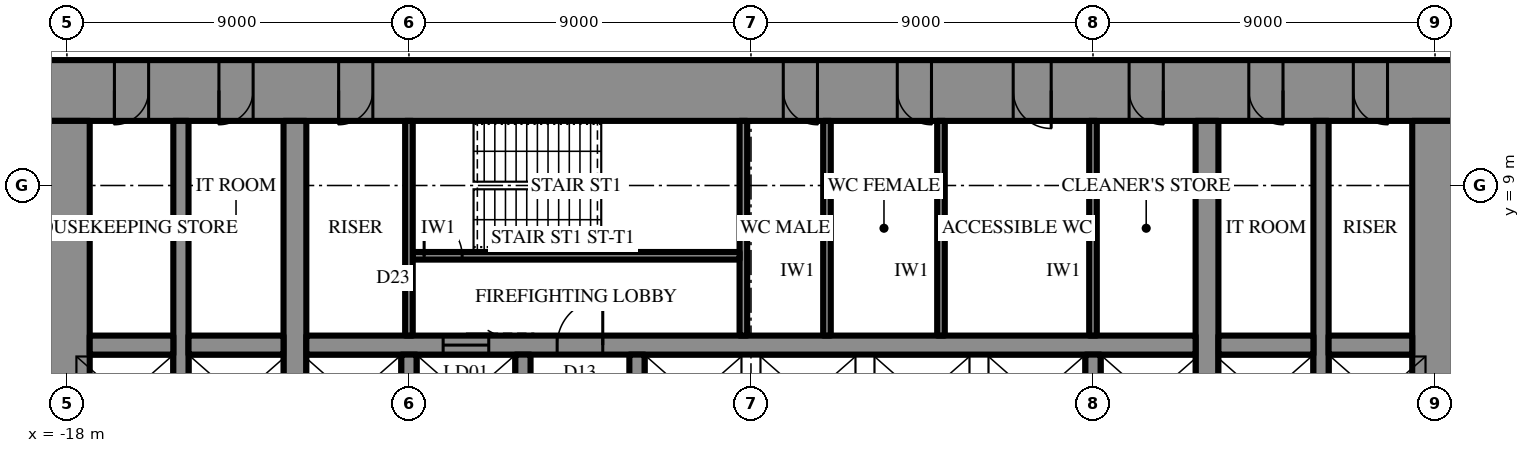
"""IFC4 building model, lengths in metres.
Left out: names, types, materials, properties, quantities, classifications, styles, units other than length and angle.
Written with IfcOpenShell. Run it as: python <this file> out.ifc"""

import sys

from ifc_helpers import new_model, si_unit, direction, frame, frame_2d, origin, place, context, subcontext, project, spatial, rectangle, extrude, element, fill, save


model = new_model("IFC4")
c1 = context("Model", 3, precision=1e-05, world=origin(), true_north=direction((0.0, 1.0)))
c2 = subcontext(c1, "Body", "Model", "MODEL_VIEW")
j1 = project(units=[si_unit("LENGTHUNIT", "METRE"), si_unit("PLANEANGLEUNIT", "RADIAN")], contexts=[c1])
p1 = place(None, origin())
s1 = spatial("IfcSite", under=j1, at=p1, CompositionType="ELEMENT")
p2 = place(p1, origin())
s2 = spatial("IfcBuilding", under=s1, at=p2, CompositionType="ELEMENT")
p3 = place(p2, frame((0.0, 0.0, -4.5)))
s3 = spatial("IfcBuildingStorey", under=s2, at=p3, CompositionType="ELEMENT", Elevation=-4.5)
p4 = place(p3, frame((-18.6, 11.5, 0.0), z_axis=(0.0, 0.0, 1.0), x_axis=(1.0, 0.0, 0.0)))
e1 = element("IfcWall", 1, at=p4, inside=s3, PredefinedType="SHEAR", context=c2, shape_type="SweptSolid", body=[
    extrude(rectangle(XDim=37.2, YDim=1.6, at=frame_2d((18.6, 0.0))), origin(), (0.0, 0.0, 1.0), 4.5),
])
p5 = place(p4, frame((19.45, 0.0, 0.0)))
e2 = element("IfcOpeningElement", 2, at=p5, cuts=e1, PredefinedType="OPENING", context=c2, shape_type="SweptSolid", body=[
    extrude(rectangle(XDim=0.9, YDim=2.2, at=frame_2d((0.45, 1.1))), frame((0.0, 0.81, 0.0), z_axis=(0.0, -1.0, 0.0), x_axis=(1.0, 0.0, 0.0)), (0.0, 0.0, 1.0), 1.62),
])
p6 = place(p4, frame((22.45, 0.0, 0.0)))
e3 = element("IfcOpeningElement", 3, at=p6, cuts=e1, PredefinedType="OPENING", context=c2, shape_type="SweptSolid", body=[
    extrude(rectangle(XDim=0.9, YDim=2.2, at=frame_2d((0.45, 1.1))), frame((0.0, 0.81, 0.0), z_axis=(0.0, -1.0, 0.0), x_axis=(1.0, 0.0, 0.0)), (0.0, 0.0, 1.0), 1.62),
])
p7 = place(p4, frame((25.5, 0.0, 0.0)))
e4 = element("IfcOpeningElement", 4, at=p7, cuts=e1, PredefinedType="OPENING", context=c2, shape_type="SweptSolid", body=[
    extrude(rectangle(XDim=1.0, YDim=2.2, at=frame_2d((0.5, 1.1))), frame((0.0, 0.81, 0.0), z_axis=(0.0, -1.0, 0.0), x_axis=(1.0, 0.0, 0.0)), (0.0, 0.0, 1.0), 1.62),
])
p8 = place(p4, frame((1.85, 0.0, 0.0)))
e5 = element("IfcOpeningElement", 5, at=p8, cuts=e1, PredefinedType="OPENING", context=c2, shape_type="SweptSolid", body=[
    extrude(rectangle(XDim=0.9, YDim=2.2, at=frame_2d((0.45, 1.1))), frame((0.0, 0.81, 0.0), z_axis=(0.0, -1.0, 0.0), x_axis=(1.0, 0.0, 0.0)), (0.0, 0.0, 1.0), 1.62),
])
p9 = place(p4, frame((4.6, 0.0, 0.0)))
e6 = element("IfcOpeningElement", 6, at=p9, cuts=e1, PredefinedType="OPENING", context=c2, shape_type="SweptSolid", body=[
    extrude(rectangle(XDim=0.9, YDim=2.2, at=frame_2d((0.45, 1.1))), frame((0.0, 0.81, 0.0), z_axis=(0.0, -1.0, 0.0), x_axis=(1.0, 0.0, 0.0)), (0.0, 0.0, 1.0), 1.62),
])
p10 = place(p4, frame((7.75, 0.0, 0.0)))
e7 = element("IfcOpeningElement", 7, at=p10, cuts=e1, PredefinedType="OPENING", context=c2, shape_type="SweptSolid", body=[
    extrude(rectangle(XDim=0.9, YDim=2.2, at=frame_2d((0.45, 1.1))), frame((0.0, 0.81, 0.0), z_axis=(0.0, -1.0, 0.0), x_axis=(1.0, 0.0, 0.0)), (0.0, 0.0, 1.0), 1.62),
])
p11 = place(p4, frame((28.55, 0.0, 0.0)))
e8 = element("IfcOpeningElement", 8, at=p11, cuts=e1, PredefinedType="OPENING", context=c2, shape_type="SweptSolid", body=[
    extrude(rectangle(XDim=0.9, YDim=2.2, at=frame_2d((0.45, 1.1))), frame((0.0, 0.81, 0.0), z_axis=(0.0, -1.0, 0.0), x_axis=(1.0, 0.0, 0.0)), (0.0, 0.0, 1.0), 1.62),
])
p12 = place(p4, frame((31.7, 0.0, 0.0)))
e9 = element("IfcOpeningElement", 9, at=p12, cuts=e1, PredefinedType="OPENING", context=c2, shape_type="SweptSolid", body=[
    extrude(rectangle(XDim=0.9, YDim=2.2, at=frame_2d((0.45, 1.1))), frame((0.0, 0.81, 0.0), z_axis=(0.0, -1.0, 0.0), x_axis=(1.0, 0.0, 0.0)), (0.0, 0.0, 1.0), 1.62),
])
p13 = place(p4, frame((34.45, 0.0, 0.0)))
e10 = element("IfcOpeningElement", 10, at=p13, cuts=e1, PredefinedType="OPENING", context=c2, shape_type="SweptSolid", body=[
    extrude(rectangle(XDim=0.9, YDim=2.2, at=frame_2d((0.45, 1.1))), frame((0.0, 0.81, 0.0), z_axis=(0.0, -1.0, 0.0), x_axis=(1.0, 0.0, 0.0)), (0.0, 0.0, 1.0), 1.62),
])
p14 = place(p3, frame((18.0, -10.7, 0.0), z_axis=(0.0, 0.0, 1.0), x_axis=(0.0, 1.0, 0.0)))
e11 = element("IfcWall", 11, at=p14, inside=s3, PredefinedType="SHEAR", context=c2, shape_type="SweptSolid", body=[
    extrude(rectangle(XDim=21.4, YDim=1.2, at=frame_2d((10.7, 0.0))), origin(), (0.0, 0.0, 1.0), 4.5),
])
p15 = place(p14, frame((9.8, 0.0, 0.0)))
e12 = element("IfcOpeningElement", 12, at=p15, cuts=e11, PredefinedType="OPENING", context=c2, shape_type="SweptSolid", body=[
    extrude(rectangle(XDim=1.8, YDim=2.4, at=frame_2d((0.9, 1.2))), frame((0.0, 0.61, 0.0), z_axis=(0.0, -1.0, 0.0), x_axis=(1.0, 0.0, 0.0)), (0.0, 0.0, 1.0), 1.22),
])
p16 = place(p3, frame((-18.0, 10.7, 0.0), z_axis=(0.0, 0.0, 1.0), x_axis=(0.0, -1.0, 0.0)))
e13 = element("IfcWall", 13, at=p16, inside=s3, PredefinedType="SHEAR", context=c2, shape_type="SweptSolid", body=[
    extrude(rectangle(XDim=21.4, YDim=1.2, at=frame_2d((10.7, 0.0))), origin(), (0.0, 0.0, 1.0), 4.5),
])
p17 = place(p16, frame((9.8, 0.0, 0.0)))
e14 = element("IfcOpeningElement", 14, at=p17, cuts=e13, PredefinedType="OPENING", context=c2, shape_type="SweptSolid", body=[
    extrude(rectangle(XDim=1.8, YDim=2.4, at=frame_2d((0.9, 1.2))), frame((0.0, 0.61, 0.0), z_axis=(0.0, -1.0, 0.0), x_axis=(1.0, 0.0, 0.0)), (0.0, 0.0, 1.0), 1.22),
])
p18 = place(p3, frame((12.0, -10.7, 0.0), z_axis=(0.0, 0.0, 1.0), x_axis=(0.0, 1.0, 0.0)))
e15 = element("IfcWall", 15, at=p18, inside=s3, PredefinedType="SHEAR", context=c2, shape_type="SweptSolid", body=[
    extrude(rectangle(XDim=21.4, YDim=0.6, at=frame_2d((10.7, 0.0))), origin(), (0.0, 0.0, 1.0), 4.5),
])
p19 = place(p18, frame((9.8, 0.0, 0.0)))
e16 = element("IfcOpeningElement", 16, at=p19, cuts=e15, PredefinedType="OPENING", context=c2, shape_type="SweptSolid", body=[
    extrude(rectangle(XDim=1.8, YDim=2.4, at=frame_2d((0.9, 1.2))), frame((0.0, 0.31, 0.0), z_axis=(0.0, -1.0, 0.0), x_axis=(1.0, 0.0, 0.0)), (0.0, 0.0, 1.0), 0.62),
])
p20 = place(p3, frame((-12.0, -10.7, 0.0), z_axis=(0.0, 0.0, 1.0), x_axis=(0.0, 1.0, 0.0)))
e17 = element("IfcWall", 17, at=p20, inside=s3, PredefinedType="SHEAR", context=c2, shape_type="SweptSolid", body=[
    extrude(rectangle(XDim=21.4, YDim=0.6, at=frame_2d((10.7, 0.0))), origin(), (0.0, 0.0, 1.0), 4.5),
])
p21 = place(p20, frame((9.8, 0.0, 0.0)))
e18 = element("IfcOpeningElement", 18, at=p21, cuts=e17, PredefinedType="OPENING", context=c2, shape_type="SweptSolid", body=[
    extrude(rectangle(XDim=1.8, YDim=2.4, at=frame_2d((0.9, 1.2))), frame((0.0, 0.31, 0.0), z_axis=(0.0, -1.0, 0.0), x_axis=(1.0, 0.0, 0.0)), (0.0, 0.0, 1.0), 0.62),
])
p22 = place(p3, frame((15.0, -10.7, 0.0), z_axis=(0.0, 0.0, 1.0), x_axis=(0.0, 1.0, 0.0)))
e19 = element("IfcWall", 19, at=p22, inside=s3, PredefinedType="SHEAR", context=c2, shape_type="SweptSolid", body=[
    extrude(rectangle(XDim=21.4, YDim=0.4, at=frame_2d((10.7, 0.0))), origin(), (0.0, 0.0, 1.0), 4.5),
])
p23 = place(p22, frame((9.8, 0.0, 0.0)))
e20 = element("IfcOpeningElement", 20, at=p23, cuts=e19, PredefinedType="OPENING", context=c2, shape_type="SweptSolid", body=[
    extrude(rectangle(XDim=1.8, YDim=2.4, at=frame_2d((0.9, 1.2))), frame((0.0, 0.21, 0.0), z_axis=(0.0, -1.0, 0.0), x_axis=(1.0, 0.0, 0.0)), (0.0, 0.0, 1.0), 0.42),
])
p24 = place(p3, frame((-15.0, -10.7, 0.0), z_axis=(0.0, 0.0, 1.0), x_axis=(0.0, 1.0, 0.0)))
e21 = element("IfcWall", 21, at=p24, inside=s3, PredefinedType="SHEAR", context=c2, shape_type="SweptSolid", body=[
    extrude(rectangle(XDim=21.4, YDim=0.4, at=frame_2d((10.7, 0.0))), origin(), (0.0, 0.0, 1.0), 4.5),
])
p25 = place(p24, frame((9.8, 0.0, 0.0)))
e22 = element("IfcOpeningElement", 22, at=p25, cuts=e21, PredefinedType="OPENING", context=c2, shape_type="SweptSolid", body=[
    extrude(rectangle(XDim=1.8, YDim=2.4, at=frame_2d((0.9, 1.2))), frame((0.0, 0.21, 0.0), z_axis=(0.0, -1.0, 0.0), x_axis=(1.0, 0.0, 0.0)), (0.0, 0.0, 1.0), 0.42),
])
p26 = place(p3, frame((-17.4, 4.8, 0.0), z_axis=(0.0, 0.0, 1.0), x_axis=(1.0, 0.0, 0.0)))
e23 = element("IfcWall", 23, at=p26, inside=s3, PredefinedType="SHEAR", context=c2, shape_type="SweptSolid", body=[
    extrude(rectangle(XDim=2.2, YDim=0.5, at=frame_2d((1.1, 0.0))), origin(), (0.0, 0.0, 1.0), 4.5),
])
p27 = place(p3, frame((-14.8, 4.8, 0.0), z_axis=(0.0, 0.0, 1.0), x_axis=(1.0, 0.0, 0.0)))
e24 = element("IfcWall", 24, at=p27, inside=s3, PredefinedType="SHEAR", context=c2, shape_type="SweptSolid", body=[
    extrude(rectangle(XDim=2.5, YDim=0.5, at=frame_2d((1.25, 0.0))), origin(), (0.0, 0.0, 1.0), 4.5),
])
p28 = place(p3, frame((-11.7, 4.8, 0.0), z_axis=(0.0, 0.0, 1.0), x_axis=(1.0, 0.0, 0.0)))
e25 = element("IfcWall", 25, at=p28, inside=s3, PredefinedType="SHEAR", context=c2, shape_type="SweptSolid", body=[
    extrude(rectangle(XDim=23.4, YDim=0.5, at=frame_2d((11.7, 0.0))), origin(), (0.0, 0.0, 1.0), 4.5),
])
p29 = place(p28, frame((6.6, 0.0, 0.0)))
e26 = element("IfcOpeningElement", 26, at=p29, cuts=e25, PredefinedType="OPENING", context=c2, shape_type="SweptSolid", body=[
    extrude(rectangle(XDim=1.2, YDim=2.2, at=frame_2d((0.6, 1.1))), frame((0.0, 0.26, 0.0), z_axis=(0.0, -1.0, 0.0), x_axis=(1.0, 0.0, 0.0)), (0.0, 0.0, 1.0), 0.52),
])
p30 = place(p28, frame((3.6, 0.0, 0.0)))
e27 = element("IfcOpeningElement", 27, at=p30, cuts=e25, PredefinedType="OPENING", context=c2, shape_type="SweptSolid", body=[
    extrude(rectangle(XDim=1.2, YDim=2.2, at=frame_2d((0.6, 1.1))), frame((0.0, 0.26, 0.0), z_axis=(0.0, -1.0, 0.0), x_axis=(1.0, 0.0, 0.0)), (0.0, 0.0, 1.0), 0.52),
])
p31 = place(p3, frame((12.3, 4.8, 0.0), z_axis=(0.0, 0.0, 1.0), x_axis=(1.0, 0.0, 0.0)))
e28 = element("IfcWall", 28, at=p31, inside=s3, PredefinedType="SHEAR", context=c2, shape_type="SweptSolid", body=[
    extrude(rectangle(XDim=2.5, YDim=0.5, at=frame_2d((1.25, 0.0))), origin(), (0.0, 0.0, 1.0), 4.5),
])
p32 = place(p3, frame((15.2, 4.8, 0.0), z_axis=(0.0, 0.0, 1.0), x_axis=(1.0, 0.0, 0.0)))
e29 = element("IfcWall", 29, at=p32, inside=s3, PredefinedType="SHEAR", context=c2, shape_type="SweptSolid", body=[
    extrude(rectangle(XDim=2.2, YDim=0.5, at=frame_2d((1.1, 0.0))), origin(), (0.0, 0.0, 1.0), 4.5),
])
for number, where, z_axis, x_axis in (
    (30, (-9.0, 2.25, 0.0), (0.0, 0.0, 1.0), (0.0, 1.0, 0.0)),
    (31, (-6.0, 2.25, 0.0), (0.0, 0.0, 1.0), (0.0, 1.0, 0.0)),
    (32, (-3.0, 2.25, 0.0), (0.0, 0.0, 1.0), (0.0, 1.0, 0.0)),
    (33, (9.0, 2.25, 0.0), (0.0, 0.0, 1.0), (0.0, 1.0, 0.0)),
):
    element("IfcWall", number, at=place(p3, frame(where, z_axis=z_axis, x_axis=x_axis)), inside=s3, PredefinedType="SHEAR", context=c2, shape_type="SweptSolid", body=[
        extrude(rectangle(XDim=2.3, YDim=0.4, at=frame_2d((1.15, 0.0))), origin(), (0.0, 0.0, 1.0), 4.5),
    ])
p33 = place(p3, frame((-0.2, 5.05, 0.0), z_axis=(0.0, 0.0, 1.0), x_axis=(0.0, 1.0, 0.0)))
e34 = element("IfcWall", 34, at=p33, inside=s3, PredefinedType="SHEAR", context=c2, shape_type="SweptSolid", body=[
    extrude(rectangle(XDim=5.65, YDim=0.2, at=frame_2d((2.825, 0.0))), origin(), (0.0, 0.0, 1.0), 4.5),
])
p34 = place(p3, frame((-8.9, 7.15, 0.0), z_axis=(0.0, 0.0, 1.0), x_axis=(1.0, 0.0, 0.0)))
e35 = element("IfcWall", 35, at=p34, inside=s3, PredefinedType="SHEAR", context=c2, shape_type="SweptSolid", body=[
    extrude(rectangle(XDim=8.6, YDim=0.2, at=frame_2d((4.3, 0.0))), origin(), (0.0, 0.0, 1.0), 4.5),
])
p35 = place(p34, frame((0.3, 0.0, 0.0)))
e36 = element("IfcOpeningElement", 36, at=p35, cuts=e35, PredefinedType="OPENING", context=c2, shape_type="SweptSolid", body=[
    extrude(rectangle(XDim=1.0, YDim=2.2, at=frame_2d((0.5, 1.1))), frame((0.0, 0.11, 0.0), z_axis=(0.0, -1.0, 0.0), x_axis=(1.0, 0.0, 0.0)), (0.0, 0.0, 1.0), 0.22),
])
for number, where, z_axis, x_axis in (
    (37, (-9.0, 5.05, 0.0), (0.0, 0.0, 1.0), (0.0, 1.0, 0.0)),
    (38, (9.0, 5.05, 0.0), (0.0, 0.0, 1.0), (0.0, 1.0, 0.0)),
    (39, (2.0, 5.05, 0.0), (0.0, 0.0, 1.0), (0.0, 1.0, 0.0)),
    (40, (5.0, 5.05, 0.0), (0.0, 0.0, 1.0), (0.0, 1.0, 0.0)),
):
    element("IfcWall", number, at=place(p3, frame(where, z_axis=z_axis, x_axis=x_axis)), inside=s3, PredefinedType="PARTITIONING", context=c2, shape_type="SweptSolid", body=[
        extrude(rectangle(XDim=5.65, YDim=0.2, at=frame_2d((2.825, 0.0))), origin(), (0.0, 0.0, 1.0), 4.15),
    ])
p36 = place(p29, origin())
e41 = element("IfcDoor", 41, at=p36, inside=s3, OperationType="SINGLE_SWING_LEFT", PredefinedType="DOOR", context=c2, shape_type="SweptSolid", body=[
    extrude(rectangle(XDim=1.2, YDim=2.2, at=frame_2d((0.6, 1.1))), frame((0.0, 0.025, 0.0), z_axis=(0.0, -1.0, 0.0), x_axis=(1.0, 0.0, 0.0)), (0.0, 0.0, 1.0), 0.05),
])
fill(e26, e41)
p37 = place(p35, origin())
e42 = element("IfcDoor", 42, at=p37, inside=s3, OperationType="SINGLE_SWING_RIGHT", PredefinedType="DOOR", context=c2, shape_type="SweptSolid", body=[
    extrude(rectangle(XDim=1.0, YDim=2.2, at=frame_2d((0.5, 1.1))), frame((0.0, 0.025, 0.0), z_axis=(0.0, -1.0, 0.0), x_axis=(1.0, 0.0, 0.0)), (0.0, 0.0, 1.0), 0.05),
])
fill(e36, e42)
p38 = place(p5, frame((0.9, 0.0, 0.0), z_axis=(0.0, 0.0, 1.0), x_axis=(-1.0, 0.0, 0.0)))
e43 = element("IfcDoor", 43, at=p38, inside=s3, OperationType="SINGLE_SWING_RIGHT", PredefinedType="DOOR", context=c2, shape_type="SweptSolid", body=[
    extrude(rectangle(XDim=0.9, YDim=2.2, at=frame_2d((0.45, 1.1))), frame((0.0, 0.025, 0.0), z_axis=(0.0, -1.0, 0.0), x_axis=(1.0, 0.0, 0.0)), (0.0, 0.0, 1.0), 0.05),
])
fill(e2, e43)
p39 = place(p6, frame((0.9, 0.0, 0.0), z_axis=(0.0, 0.0, 1.0), x_axis=(-1.0, 0.0, 0.0)))
e44 = element("IfcDoor", 44, at=p39, inside=s3, OperationType="SINGLE_SWING_RIGHT", PredefinedType="DOOR", context=c2, shape_type="SweptSolid", body=[
    extrude(rectangle(XDim=0.9, YDim=2.2, at=frame_2d((0.45, 1.1))), frame((0.0, 0.025, 0.0), z_axis=(0.0, -1.0, 0.0), x_axis=(1.0, 0.0, 0.0)), (0.0, 0.0, 1.0), 0.05),
])
fill(e3, e44)
p40 = place(p7, frame((1.0, 0.0, 0.0), z_axis=(0.0, 0.0, 1.0), x_axis=(-1.0, 0.0, 0.0)))
e45 = element("IfcDoor", 45, at=p40, inside=s3, OperationType="SINGLE_SWING_RIGHT", PredefinedType="DOOR", context=c2, shape_type="SweptSolid", body=[
    extrude(rectangle(XDim=1.0, YDim=2.2, at=frame_2d((0.5, 1.1))), frame((0.0, 0.025, 0.0), z_axis=(0.0, -1.0, 0.0), x_axis=(1.0, 0.0, 0.0)), (0.0, 0.0, 1.0), 0.05),
])
fill(e4, e45)
p41 = place(p8, frame((0.9, 0.0, 0.0), z_axis=(0.0, 0.0, 1.0), x_axis=(-1.0, 0.0, 0.0)))
e46 = element("IfcDoor", 46, at=p41, inside=s3, OperationType="SINGLE_SWING_LEFT", PredefinedType="DOOR", context=c2, shape_type="SweptSolid", body=[
    extrude(rectangle(XDim=0.9, YDim=2.2, at=frame_2d((0.45, 1.1))), frame((0.0, 0.025, 0.0), z_axis=(0.0, -1.0, 0.0), x_axis=(1.0, 0.0, 0.0)), (0.0, 0.0, 1.0), 0.05),
])
fill(e5, e46)
p42 = place(p9, frame((0.9, 0.0, 0.0), z_axis=(0.0, 0.0, 1.0), x_axis=(-1.0, 0.0, 0.0)))
e47 = element("IfcDoor", 47, at=p42, inside=s3, OperationType="SINGLE_SWING_LEFT", PredefinedType="DOOR", context=c2, shape_type="SweptSolid", body=[
    extrude(rectangle(XDim=0.9, YDim=2.2, at=frame_2d((0.45, 1.1))), frame((0.0, 0.025, 0.0), z_axis=(0.0, -1.0, 0.0), x_axis=(1.0, 0.0, 0.0)), (0.0, 0.0, 1.0), 0.05),
])
fill(e6, e47)
p43 = place(p10, frame((0.9, 0.0, 0.0), z_axis=(0.0, 0.0, 1.0), x_axis=(-1.0, 0.0, 0.0)))
e48 = element("IfcDoor", 48, at=p43, inside=s3, OperationType="SINGLE_SWING_LEFT", PredefinedType="DOOR", context=c2, shape_type="SweptSolid", body=[
    extrude(rectangle(XDim=0.9, YDim=2.2, at=frame_2d((0.45, 1.1))), frame((0.0, 0.025, 0.0), z_axis=(0.0, -1.0, 0.0), x_axis=(1.0, 0.0, 0.0)), (0.0, 0.0, 1.0), 0.05),
])
fill(e7, e48)
p44 = place(p11, frame((0.9, 0.0, 0.0), z_axis=(0.0, 0.0, 1.0), x_axis=(-1.0, 0.0, 0.0)))
e49 = element("IfcDoor", 49, at=p44, inside=s3, OperationType="SINGLE_SWING_RIGHT", PredefinedType="DOOR", context=c2, shape_type="SweptSolid", body=[
    extrude(rectangle(XDim=0.9, YDim=2.2, at=frame_2d((0.45, 1.1))), frame((0.0, 0.025, 0.0), z_axis=(0.0, -1.0, 0.0), x_axis=(1.0, 0.0, 0.0)), (0.0, 0.0, 1.0), 0.05),
])
fill(e8, e49)
p45 = place(p12, frame((0.9, 0.0, 0.0), z_axis=(0.0, 0.0, 1.0), x_axis=(-1.0, 0.0, 0.0)))
e50 = element("IfcDoor", 50, at=p45, inside=s3, OperationType="SINGLE_SWING_RIGHT", PredefinedType="DOOR", context=c2, shape_type="SweptSolid", body=[
    extrude(rectangle(XDim=0.9, YDim=2.2, at=frame_2d((0.45, 1.1))), frame((0.0, 0.025, 0.0), z_axis=(0.0, -1.0, 0.0), x_axis=(1.0, 0.0, 0.0)), (0.0, 0.0, 1.0), 0.05),
])
fill(e9, e50)
p46 = place(p13, frame((0.9, 0.0, 0.0), z_axis=(0.0, 0.0, 1.0), x_axis=(-1.0, 0.0, 0.0)))
e51 = element("IfcDoor", 51, at=p46, inside=s3, OperationType="SINGLE_SWING_RIGHT", PredefinedType="DOOR", context=c2, shape_type="SweptSolid", body=[
    extrude(rectangle(XDim=0.9, YDim=2.2, at=frame_2d((0.45, 1.1))), frame((0.0, 0.025, 0.0), z_axis=(0.0, -1.0, 0.0), x_axis=(1.0, 0.0, 0.0)), (0.0, 0.0, 1.0), 0.05),
])
fill(e10, e51)
p47 = place(p30, origin())
e52 = element("IfcDoor", 52, at=p47, inside=s3, OperationType="SLIDING_TO_LEFT", PredefinedType="DOOR", context=c2, shape_type="SweptSolid", body=[
    extrude(rectangle(XDim=1.2, YDim=2.2, at=frame_2d((0.6, 1.1))), frame((0.0, 0.025, 0.0), z_axis=(0.0, -1.0, 0.0), x_axis=(1.0, 0.0, 0.0)), (0.0, 0.0, 1.0), 0.05),
])
fill(e27, e52)
save(model, sys.argv[1])
